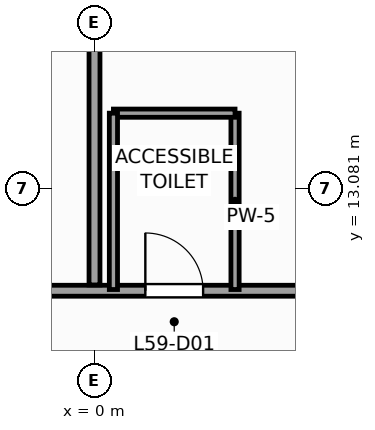
"""IFC4 building model, lengths in metres.
Left out: names, types, materials, properties, quantities, classifications, styles, units other than length and angle.
Written with IfcOpenShell. Run it as: python <this file> out.ifc"""

import sys

from ifc_helpers import new_model, si_unit, direction, frame, frame_2d, origin, place, context, subcontext, project, spatial, rectangle, extrude, source, transform, mapped, element, fill, save


model = new_model("IFC4")
c1 = context("Model", 3, precision=1e-05, world=origin(), true_north=direction((0.0, 1.0)))
c2 = subcontext(c1, "Body", "Model", "MODEL_VIEW")
j1 = project(units=[si_unit("LENGTHUNIT", "METRE"), si_unit("PLANEANGLEUNIT", "RADIAN")], contexts=[c1])
p1 = place(None, origin())
s1 = spatial("IfcSite", under=j1, at=p1, CompositionType="ELEMENT")
p2 = place(p1, origin())
s2 = spatial("IfcBuilding", under=s1, at=p2, CompositionType="ELEMENT")
p3 = place(p2, frame((0.0, 0.0, 244.6)))
s3 = spatial("IfcBuildingStorey", under=s2, at=p3, CompositionType="ELEMENT", Elevation=244.6)
p4 = place(p3, frame((29.154, 6.733, 0.0), z_axis=(0.0, 0.0, 1.0), x_axis=(-0.77714192302, 0.629325378072, 0.0)))
e1 = element("IfcWall", 1, at=p4, inside=s3, PredefinedType="STANDARD", context=c2, shape_type="SweptSolid", body=[
    extrude(rectangle(XDim=36.84, YDim=0.34, at=frame_2d((18.42, 0.0))), origin(), (0.0, 0.0, 1.0), 2.96),
])
p5 = place(p4, frame((3.721, 0.0, 0.48)))
e2 = element("IfcOpeningElement", 2, at=p5, cuts=e1, PredefinedType="OPENING", context=c2, shape_type="SweptSolid", body=[
    extrude(rectangle(XDim=1.4, YDim=2.4, at=frame_2d((0.7, 1.2))), frame((0.0, 0.18, 0.0), z_axis=(0.0, -1.0, 0.0), x_axis=(1.0, 0.0, 0.0)), (0.0, 0.0, 1.0), 0.36),
])
p6 = place(p4, frame((9.809, 0.0, 0.58)))
e3 = element("IfcOpeningElement", 3, at=p6, cuts=e1, PredefinedType="OPENING", context=c2, shape_type="SweptSolid", body=[
    extrude(rectangle(XDim=1.75, YDim=2.3, at=frame_2d((0.875, 1.15))), frame((0.0, 0.18, 0.0), z_axis=(0.0, -1.0, 0.0), x_axis=(1.0, 0.0, 0.0)), (0.0, 0.0, 1.0), 0.36),
])
p7 = place(p4, frame((16.058, 0.0, 0.58)))
e4 = element("IfcOpeningElement", 4, at=p7, cuts=e1, PredefinedType="OPENING", context=c2, shape_type="SweptSolid", body=[
    extrude(rectangle(XDim=1.75, YDim=2.3, at=frame_2d((0.875, 1.15))), frame((0.0, 0.18, 0.0), z_axis=(0.0, -1.0, 0.0), x_axis=(1.0, 0.0, 0.0)), (0.0, 0.0, 1.0), 0.36),
])
p8 = place(p4, frame((24.176, 0.0, 0.58)))
e5 = element("IfcOpeningElement", 5, at=p8, cuts=e1, PredefinedType="OPENING", context=c2, shape_type="SweptSolid", body=[
    extrude(rectangle(XDim=1.75, YDim=2.3, at=frame_2d((0.875, 1.15))), frame((0.0, 0.18, 0.0), z_axis=(0.0, -1.0, 0.0), x_axis=(1.0, 0.0, 0.0)), (0.0, 0.0, 1.0), 0.36),
])
p9 = place(p4, frame((30.982, 0.0, 0.48)))
e6 = element("IfcOpeningElement", 6, at=p9, cuts=e1, PredefinedType="OPENING", context=c2, shape_type="SweptSolid", body=[
    extrude(rectangle(XDim=1.4, YDim=2.4, at=frame_2d((0.7, 1.2))), frame((0.0, 0.18, 0.0), z_axis=(0.0, -1.0, 0.0), x_axis=(1.0, 0.0, 0.0)), (0.0, 0.0, 1.0), 0.36),
])
p10 = place(p3, frame((-10.3, 11.4, 0.0), z_axis=(0.0, 0.0, 1.0), x_axis=(1.0, 0.0, 0.0)))
e7 = element("IfcWall", 7, at=p10, inside=s3, PredefinedType="PARTITIONING", context=c2, shape_type="SweptSolid", body=[
    extrude(rectangle(XDim=22.75, YDim=0.18, at=frame_2d((11.375, 0.0))), origin(), (0.0, 0.0, 1.0), 3.66),
])
p11 = place(p10, frame((11.136, 0.0, 0.0)))
e8 = element("IfcOpeningElement", 8, at=p11, cuts=e7, PredefinedType="OPENING", context=c2, shape_type="SweptSolid", body=[
    extrude(rectangle(XDim=0.95, YDim=2.1, at=frame_2d((0.475, 1.05))), frame((0.0, 0.1, 0.0), z_axis=(0.0, -1.0, 0.0), x_axis=(1.0, 0.0, 0.0)), (0.0, 0.0, 1.0), 0.2),
])
p12 = place(p10, frame((1.58, 0.0, 0.0)))
e9 = element("IfcOpeningElement", 9, at=p12, cuts=e7, PredefinedType="OPENING", context=c2, shape_type="SweptSolid", body=[
    extrude(rectangle(XDim=0.95, YDim=2.1, at=frame_2d((0.475, 1.05))), frame((0.0, 0.1, 0.0), z_axis=(0.0, -1.0, 0.0), x_axis=(1.0, 0.0, 0.0)), (0.0, 0.0, 1.0), 0.2),
])
p13 = place(p3, frame((0.0, 11.495, 0.0), z_axis=(0.0, 0.0, 1.0), x_axis=(0.0, 1.0, 0.0)))
e10 = element("IfcWall", 10, at=p13, inside=s3, PredefinedType="PARTITIONING", context=c2, shape_type="SweptSolid", body=[
    extrude(rectangle(XDim=17.067, YDim=0.18, at=frame_2d((8.534, 0.0))), origin(), (0.0, 0.0, 1.0), 3.66),
])
p14 = place(p3, frame((2.311, 11.42, 0.0), z_axis=(0.0, 0.0, 1.0), x_axis=(0.0, 1.0, 0.0)))
e11 = element("IfcWall", 11, at=p14, inside=s3, PredefinedType="PARTITIONING", context=c2, shape_type="SweptSolid", body=[
    extrude(rectangle(XDim=2.9, YDim=0.135, at=frame_2d((1.45, 0.0))), origin(), (0.0, 0.0, 1.0), 3.66),
])
p15 = place(p3, frame((0.311, 14.32, 0.0), z_axis=(0.0, 0.0, 1.0), x_axis=(1.0, 0.0, 0.0)))
e12 = element("IfcWall", 12, at=p15, inside=s3, PredefinedType="PARTITIONING", context=c2, shape_type="SweptSolid", body=[
    extrude(rectangle(XDim=2.0, YDim=0.135, at=frame_2d((1.0, 0.0))), origin(), (0.0, 0.0, 1.0), 3.66),
])
p16 = place(p3, frame((0.311, 11.42, 0.0), z_axis=(0.0, 0.0, 1.0), x_axis=(0.0, 1.0, 0.0)))
e13 = element("IfcWall", 13, at=p16, inside=s3, PredefinedType="PARTITIONING", context=c2, shape_type="SweptSolid", body=[
    extrude(rectangle(XDim=2.9, YDim=0.135, at=frame_2d((1.45, 0.0))), origin(), (0.0, 0.0, 1.0), 3.66),
])
m1 = source(origin(), c2, "Body", "SweptSolid", [
    extrude(rectangle(XDim=0.95, YDim=2.1, at=frame_2d((0.475, 1.05))), frame((0.0, 0.025, 0.0), z_axis=(0.0, -1.0, 0.0), x_axis=(1.0, 0.0, 0.0)), (0.0, 0.0, 1.0), 0.05),
])
p17 = place(p11, origin())
e14 = element("IfcDoor", 14, at=p17, inside=s3, OperationType="SINGLE_SWING_LEFT", PredefinedType="DOOR", context=c2, shape_type="MappedRepresentation", body=[
    mapped(m1, transform((0.0, 0.0, 0.0), scale=1.0)),
])
fill(e8, e14)
save(model, sys.argv[1])
